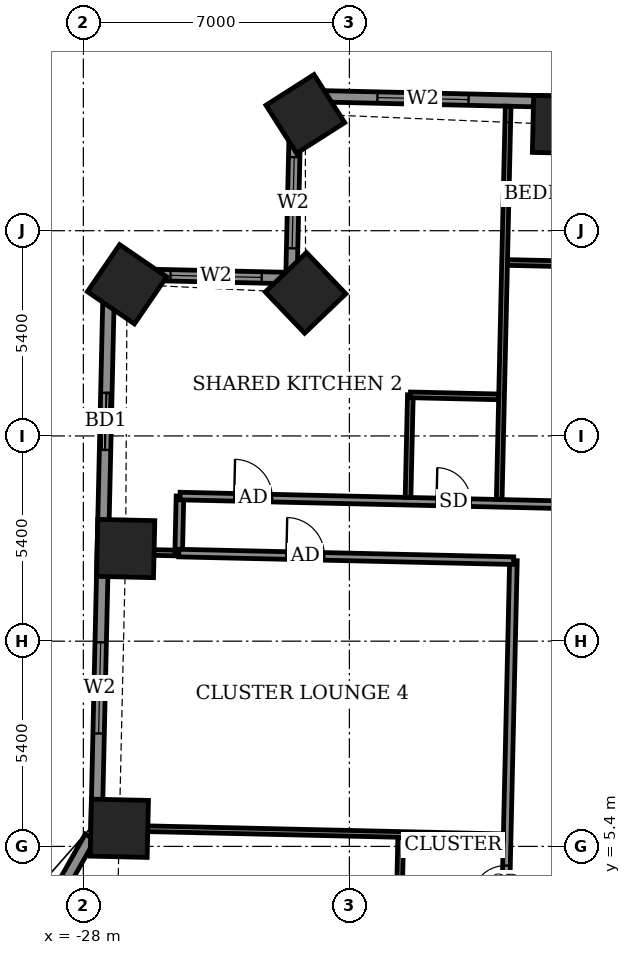
"""IFC4 building model, lengths in metres.
Left out: names, types, materials, properties, quantities, classifications, styles, units other than length and angle.
Written with IfcOpenShell. Run it as: python <this file> out.ifc"""

import sys

from ifc_helpers import new_model, si_unit, direction, frame, frame_2d, origin, origin_2d, place, context, subcontext, project, spatial, rectangle, extrude, element, fill, save


model = new_model("IFC4")
c1 = context("Model", 3, precision=1e-05, world=origin(), true_north=direction((0.0, 1.0)))
c2 = subcontext(c1, "Body", "Model", "MODEL_VIEW")
j1 = project(units=[si_unit("LENGTHUNIT", "METRE"), si_unit("PLANEANGLEUNIT", "RADIAN")], contexts=[c1])
p1 = place(None, origin())
s1 = spatial("IfcSite", under=j1, at=p1, CompositionType="ELEMENT")
p2 = place(p1, origin())
s2 = spatial("IfcBuilding", under=s1, at=p2, CompositionType="ELEMENT")
p3 = place(p2, frame((0.0, 0.0, 56.7)))
s3 = spatial("IfcBuildingStorey", under=s2, at=p3, CompositionType="ELEMENT", Elevation=56.7)
for number, where, z_axis, x_axis in (
    (1, (-15.419, 24.393, -0.55), (0.0, 0.0, 1.0), (-1.0, 0.023, 0.0)),
    (2, (-22.16, 24.673, -0.55), (0.0, 0.0, 1.0), (-0.843, -0.538, 0.0)),
    (3, (-22.154, 19.964, -0.55), (0.0, 0.0, 1.0), (-0.723, -0.691, 0.0)),
    (4, (-26.851, 20.191, -0.55), (0.0, 0.0, 1.0), (-0.565, -0.825, 0.0)),
    (5, (-26.887, 13.238, -0.55), (0.0, 0.0, 1.0), (-0.023, -1.0, 0.0)),
    (6, (-27.054, 5.877, -0.55), (0.0, 0.0, 1.0), (-0.023, -1.0, 0.0)),
):
    element("IfcColumn", number, at=place(p3, frame(where, z_axis=z_axis, x_axis=x_axis)), inside=s3, PredefinedType="COLUMN", context=c2, shape_type="SweptSolid", body=[
        extrude(rectangle(XDim=1.5, YDim=1.5, at=origin_2d()), origin(), (0.0, 0.0, 1.0), 3.6),
    ])
p4 = place(p3, frame((27.407, 24.021, 0.0), z_axis=(0.0, 0.0, 1.0), x_axis=(-0.99974239923, 0.022696589664, 0.0)))
e7 = element("IfcWall", 7, at=p4, inside=s3, PredefinedType="SOLIDWALL", context=c2, shape_type="SweptSolid", body=[
    extrude(rectangle(XDim=49.836, YDim=0.3, at=frame_2d((24.918, 0.0))), origin(), (0.0, 0.0, 1.0), 3.05),
])
p5 = place(p4, frame((2.871, 0.0, 0.0)))
e8 = element("IfcOpeningElement", 8, at=p5, cuts=e7, PredefinedType="OPENING", context=c2, shape_type="SweptSolid", body=[
    extrude(rectangle(XDim=1.5, YDim=2.4, at=frame_2d((0.75, 1.2))), frame((0.0, 0.16, 0.0), z_axis=(0.0, -1.0, 0.0), x_axis=(1.0, 0.0, 0.0)), (0.0, 0.0, 1.0), 0.32),
])
p6 = place(p4, frame((8.349, 0.0, 0.0)))
e9 = element("IfcOpeningElement", 9, at=p6, cuts=e7, PredefinedType="OPENING", context=c2, shape_type="SweptSolid", body=[
    extrude(rectangle(XDim=1.5, YDim=2.4, at=frame_2d((0.75, 1.2))), frame((0.0, 0.16, 0.0), z_axis=(0.0, -1.0, 0.0), x_axis=(1.0, 0.0, 0.0)), (0.0, 0.0, 1.0), 0.32),
])
p7 = place(p4, frame((11.43, 0.0, 0.0)))
e10 = element("IfcOpeningElement", 10, at=p7, cuts=e7, PredefinedType="OPENING", context=c2, shape_type="SweptSolid", body=[
    extrude(rectangle(XDim=1.5, YDim=2.4, at=frame_2d((0.75, 1.2))), frame((0.0, 0.16, 0.0), z_axis=(0.0, -1.0, 0.0), x_axis=(1.0, 0.0, 0.0)), (0.0, 0.0, 1.0), 0.32),
])
p8 = place(p4, frame((17.236, 0.0, 0.0)))
e11 = element("IfcOpeningElement", 11, at=p8, cuts=e7, PredefinedType="OPENING", context=c2, shape_type="SweptSolid", body=[
    extrude(rectangle(XDim=1.5, YDim=2.4, at=frame_2d((0.75, 1.2))), frame((0.0, 0.16, 0.0), z_axis=(0.0, -1.0, 0.0), x_axis=(1.0, 0.0, 0.0)), (0.0, 0.0, 1.0), 0.32),
])
p9 = place(p4, frame((22.686, 0.0, 0.0)))
e12 = element("IfcOpeningElement", 12, at=p9, cuts=e7, PredefinedType="OPENING", context=c2, shape_type="SweptSolid", body=[
    extrude(rectangle(XDim=1.5, YDim=2.4, at=frame_2d((0.75, 1.2))), frame((0.0, 0.16, 0.0), z_axis=(0.0, -1.0, 0.0), x_axis=(1.0, 0.0, 0.0)), (0.0, 0.0, 1.0), 0.32),
])
p10 = place(p4, frame((25.767, 0.0, 0.0)))
e13 = element("IfcOpeningElement", 13, at=p10, cuts=e7, PredefinedType="OPENING", context=c2, shape_type="SweptSolid", body=[
    extrude(rectangle(XDim=1.5, YDim=2.4, at=frame_2d((0.75, 1.2))), frame((0.0, 0.16, 0.0), z_axis=(0.0, -1.0, 0.0), x_axis=(1.0, 0.0, 0.0)), (0.0, 0.0, 1.0), 0.32),
])
p11 = place(p4, frame((31.211, 0.0, 0.0)))
e14 = element("IfcOpeningElement", 14, at=p11, cuts=e7, PredefinedType="OPENING", context=c2, shape_type="SweptSolid", body=[
    extrude(rectangle(XDim=1.5, YDim=2.4, at=frame_2d((0.75, 1.2))), frame((0.0, 0.16, 0.0), z_axis=(0.0, -1.0, 0.0), x_axis=(1.0, 0.0, 0.0)), (0.0, 0.0, 1.0), 0.32),
])
p12 = place(p4, frame((36.974, 0.0, 0.0)))
e15 = element("IfcOpeningElement", 15, at=p12, cuts=e7, PredefinedType="OPENING", context=c2, shape_type="SweptSolid", body=[
    extrude(rectangle(XDim=1.5, YDim=2.4, at=frame_2d((0.75, 1.2))), frame((0.0, 0.16, 0.0), z_axis=(0.0, -1.0, 0.0), x_axis=(1.0, 0.0, 0.0)), (0.0, 0.0, 1.0), 0.32),
])
p13 = place(p4, frame((40.055, 0.0, 0.0)))
e16 = element("IfcOpeningElement", 16, at=p13, cuts=e7, PredefinedType="OPENING", context=c2, shape_type="SweptSolid", body=[
    extrude(rectangle(XDim=1.5, YDim=2.4, at=frame_2d((0.75, 1.2))), frame((0.0, 0.16, 0.0), z_axis=(0.0, -1.0, 0.0), x_axis=(1.0, 0.0, 0.0)), (0.0, 0.0, 1.0), 0.32),
])
p14 = place(p4, frame((45.282, 0.0, 0.9)))
e17 = element("IfcOpeningElement", 17, at=p14, cuts=e7, PredefinedType="OPENING", context=c2, shape_type="SweptSolid", body=[
    extrude(rectangle(XDim=2.4, YDim=1.5, at=frame_2d((1.2, 0.75))), frame((0.0, 0.16, 0.0), z_axis=(0.0, -1.0, 0.0), x_axis=(1.0, 0.0, 0.0)), (0.0, 0.0, 1.0), 0.32),
])
p15 = place(p3, frame((-22.416, 25.152, 0.0), z_axis=(0.0, 0.0, 1.0), x_axis=(-0.022683280499, -0.999742701292, 0.0)))
e18 = element("IfcWall", 18, at=p15, inside=s3, PredefinedType="SOLIDWALL", context=c2, shape_type="SweptSolid", body=[
    extrude(rectangle(XDim=4.8, YDim=0.3, at=frame_2d((2.4, 0.0))), origin(), (0.0, 0.0, 1.0), 2.55),
])
p16 = place(p15, frame((1.617, 0.0, 0.9)))
e19 = element("IfcOpeningElement", 19, at=p16, cuts=e18, PredefinedType="OPENING", context=c2, shape_type="SweptSolid", body=[
    extrude(rectangle(XDim=2.4, YDim=1.5, at=frame_2d((1.2, 0.75))), frame((0.0, 0.16, 0.0), z_axis=(0.0, -1.0, 0.0), x_axis=(1.0, 0.0, 0.0)), (0.0, 0.0, 1.0), 0.32),
])
p17 = place(p3, frame((-22.525, 20.353, 0.0), z_axis=(0.0, 0.0, 1.0), x_axis=(-0.999742701292, 0.022683280499, 0.0)))
e20 = element("IfcWall", 20, at=p17, inside=s3, PredefinedType="SOLIDWALL", context=c2, shape_type="SweptSolid", body=[
    extrude(rectangle(XDim=4.8, YDim=0.3, at=frame_2d((2.4, 0.0))), origin(), (0.0, 0.0, 1.0), 2.55),
])
p18 = place(p17, frame((0.782, 0.0, 0.9)))
e21 = element("IfcOpeningElement", 21, at=p18, cuts=e20, PredefinedType="OPENING", context=c2, shape_type="SweptSolid", body=[
    extrude(rectangle(XDim=2.4, YDim=1.5, at=frame_2d((1.2, 0.75))), frame((0.0, 0.16, 0.0), z_axis=(0.0, -1.0, 0.0), x_axis=(1.0, 0.0, 0.0)), (0.0, 0.0, 1.0), 0.32),
])
p19 = place(p3, frame((-27.324, 20.462, 0.0), z_axis=(0.0, 0.0, 1.0), x_axis=(-0.022695628174, -0.999742421057, 0.0)))
e22 = element("IfcWall", 22, at=p19, inside=s3, PredefinedType="SOLIDWALL", context=c2, shape_type="SweptSolid", body=[
    extrude(rectangle(XDim=14.63, YDim=0.3, at=frame_2d((7.315, 0.0))), origin(), (0.0, 0.0, 1.0), 3.05),
])
p20 = place(p19, frame((3.13, 0.0, 0.0)))
e23 = element("IfcOpeningElement", 23, at=p20, cuts=e22, PredefinedType="OPENING", context=c2, shape_type="SweptSolid", body=[
    extrude(rectangle(XDim=1.5, YDim=2.4, at=frame_2d((0.75, 1.2))), frame((0.0, 0.16, 0.0), z_axis=(0.0, -1.0, 0.0), x_axis=(1.0, 0.0, 0.0)), (0.0, 0.0, 1.0), 0.32),
])
p21 = place(p19, frame((9.694, 0.0, 0.9)))
e24 = element("IfcOpeningElement", 24, at=p21, cuts=e22, PredefinedType="OPENING", context=c2, shape_type="SweptSolid", body=[
    extrude(rectangle(XDim=2.4, YDim=1.5, at=frame_2d((1.2, 0.75))), frame((0.0, 0.16, 0.0), z_axis=(0.0, -1.0, 0.0), x_axis=(1.0, 0.0, 0.0)), (0.0, 0.0, 1.0), 0.32),
])
p22 = place(p3, frame((-27.82, 5.65, 0.0), z_axis=(0.0, 0.0, 1.0), x_axis=(-0.492554919955, -0.870281363025, 0.0)))
e25 = element("IfcWall", 25, at=p22, inside=s3, PredefinedType="SOLIDWALL", context=c2, shape_type="SweptSolid", body=[
    extrude(rectangle(XDim=5.398, YDim=0.3, at=frame_2d((2.699, 0.0))), origin(), (0.0, 0.0, 1.0), 3.05),
])
p23 = place(p22, frame((2.008, 0.0, 0.9)))
e26 = element("IfcOpeningElement", 26, at=p23, cuts=e25, PredefinedType="OPENING", context=c2, shape_type="SweptSolid", body=[
    extrude(rectangle(XDim=1.2, YDim=1.5, at=frame_2d((0.6, 0.75))), frame((0.0, 0.16, 0.0), z_axis=(0.0, -1.0, 0.0), x_axis=(1.0, 0.0, 0.0)), (0.0, 0.0, 1.0), 0.32),
])
p24 = place(p3, frame((-17.287, -13.625, 0.0), z_axis=(0.0, 0.0, 1.0), x_axis=(0.022712214871, 0.999742044377, 0.0)))
e27 = element("IfcWall", 27, at=p24, inside=s3, PredefinedType="PARTITIONING", context=c2, shape_type="SweptSolid", body=[
    extrude(rectangle(XDim=26.551, YDim=0.2, at=frame_2d((13.275, 0.0))), origin(), (0.0, 0.0, 1.0), 3.05),
])
p25 = place(p24, frame((14.15, 0.0, 0.0)))
e28 = element("IfcOpeningElement", 28, at=p25, cuts=e27, PredefinedType="OPENING", context=c2, shape_type="SweptSolid", body=[
    extrude(rectangle(XDim=1.0, YDim=2.1, at=frame_2d((0.5, 1.05))), frame((0.0, 0.11, 0.0), z_axis=(0.0, -1.0, 0.0), x_axis=(1.0, 0.0, 0.0)), (0.0, 0.0, 1.0), 0.22),
])
p26 = place(p24, frame((17.625, 0.0, 0.0)))
e29 = element("IfcOpeningElement", 29, at=p26, cuts=e27, PredefinedType="OPENING", context=c2, shape_type="SweptSolid", body=[
    extrude(rectangle(XDim=0.9, YDim=2.1, at=frame_2d((0.45, 1.05))), frame((0.0, 0.11, 0.0), z_axis=(0.0, -1.0, 0.0), x_axis=(1.0, 0.0, 0.0)), (0.0, 0.0, 1.0), 0.22),
])
p27 = place(p24, frame((9.875, 0.0, 0.0)))
e30 = element("IfcOpeningElement", 30, at=p27, cuts=e27, PredefinedType="OPENING", context=c2, shape_type="SweptSolid", body=[
    extrude(rectangle(XDim=1.0, YDim=2.1, at=frame_2d((0.5, 1.05))), frame((0.0, 0.11, 0.0), z_axis=(0.0, -1.0, 0.0), x_axis=(1.0, 0.0, 0.0)), (0.0, 0.0, 1.0), 0.22),
])
p28 = place(p24, frame((6.475, 0.0, 0.0)))
e31 = element("IfcOpeningElement", 31, at=p28, cuts=e27, PredefinedType="OPENING", context=c2, shape_type="SweptSolid", body=[
    extrude(rectangle(XDim=0.9, YDim=2.1, at=frame_2d((0.45, 1.05))), frame((0.0, 0.11, 0.0), z_axis=(0.0, -1.0, 0.0), x_axis=(1.0, 0.0, 0.0)), (0.0, 0.0, 1.0), 0.22),
])
p29 = place(p24, frame((0.862, 0.0, 0.0)))
e32 = element("IfcOpeningElement", 32, at=p29, cuts=e27, PredefinedType="OPENING", context=c2, shape_type="SweptSolid", body=[
    extrude(rectangle(XDim=1.0, YDim=2.1, at=frame_2d((0.5, 1.05))), frame((0.0, 0.11, 0.0), z_axis=(0.0, -1.0, 0.0), x_axis=(1.0, 0.0, 0.0)), (0.0, 0.0, 1.0), 0.22),
])
p30 = place(p24, frame((3.675, 0.0, 0.0)))
e33 = element("IfcOpeningElement", 33, at=p30, cuts=e27, PredefinedType="OPENING", context=c2, shape_type="SweptSolid", body=[
    extrude(rectangle(XDim=0.9, YDim=2.1, at=frame_2d((0.45, 1.05))), frame((0.0, 0.11, 0.0), z_axis=(0.0, -1.0, 0.0), x_axis=(1.0, 0.0, 0.0)), (0.0, 0.0, 1.0), 0.22),
])
p31 = place(p3, frame((-19.703, 3.31, 0.0), z_axis=(0.0, 0.0, 1.0), x_axis=(0.02279059109, 0.999740260747, 0.0)))
e34 = element("IfcWall", 34, at=p31, inside=s3, PredefinedType="PARTITIONING", context=c2, shape_type="SweptSolid", body=[
    extrude(rectangle(XDim=2.324, YDim=0.15, at=frame_2d((1.162, 0.0))), origin(), (0.0, 0.0, 1.0), 3.05),
])
p32 = place(p3, frame((-27.505, 5.892, 0.0), z_axis=(0.0, 0.0, 1.0), x_axis=(0.999743990669, -0.022626381091, 0.0)))
e35 = element("IfcWall", 35, at=p32, inside=s3, PredefinedType="PARTITIONING", context=c2, shape_type="SweptSolid", body=[
    extrude(rectangle(XDim=10.563, YDim=0.15, at=frame_2d((5.282, 0.0))), origin(), (0.0, 0.0, 1.0), 3.05),
])
p33 = place(p3, frame((-27.34, 13.16, 0.0), z_axis=(0.0, 0.0, 1.0), x_axis=(0.999743599624, -0.02264365277, 0.0)))
e36 = element("IfcWall", 36, at=p33, inside=s3, PredefinedType="PARTITIONING", context=c2, shape_type="SweptSolid", body=[
    extrude(rectangle(XDim=1.854, YDim=0.15, at=frame_2d((0.927, 0.0))), origin(), (0.0, 0.0, 1.0), 3.05),
])
p34 = place(p3, frame((-25.492, 13.118, 0.0), z_axis=(0.0, 0.0, 1.0), x_axis=(0.022617910375, 0.999744182344, 0.0)))
e37 = element("IfcWall", 37, at=p34, inside=s3, PredefinedType="PARTITIONING", context=c2, shape_type="SweptSolid", body=[
    extrude(rectangle(XDim=1.5, YDim=0.2, at=frame_2d((0.75, 0.0))), origin(), (0.0, 0.0, 1.0), 3.05),
])
p35 = place(p3, frame((-25.49, 13.118, 0.0), z_axis=(0.0, 0.0, 1.0), x_axis=(0.999742607231, -0.02268742575, 0.0)))
e38 = element("IfcWall", 38, at=p35, inside=s3, PredefinedType="PARTITIONING", context=c2, shape_type="SweptSolid", body=[
    extrude(rectangle(XDim=8.813, YDim=0.2, at=frame_2d((4.407, 0.0))), origin(), (0.0, 0.0, 1.0), 3.05),
])
p36 = place(p35, frame((2.832, 0.0, 0.0)))
e39 = element("IfcOpeningElement", 39, at=p36, cuts=e38, PredefinedType="OPENING", context=c2, shape_type="SweptSolid", body=[
    extrude(rectangle(XDim=1.0, YDim=2.1, at=frame_2d((0.5, 1.05))), frame((0.0, 0.11, 0.0), z_axis=(0.0, -1.0, 0.0), x_axis=(1.0, 0.0, 0.0)), (0.0, 0.0, 1.0), 0.22),
])
p37 = place(p3, frame((-25.456, 14.618, 0.0), z_axis=(0.0, 0.0, 1.0), x_axis=(0.999742687583, -0.0226838847, 0.0)))
e40 = element("IfcWall", 40, at=p37, inside=s3, PredefinedType="PARTITIONING", context=c2, shape_type="SweptSolid", body=[
    extrude(rectangle(XDim=54.836, YDim=0.2, at=frame_2d((27.418, 0.0))), origin(), (0.0, 0.0, 1.0), 3.05),
])
p38 = place(p37, frame((52.493, 0.0, 0.0)))
e41 = element("IfcOpeningElement", 41, at=p38, cuts=e40, PredefinedType="OPENING", context=c2, shape_type="SweptSolid", body=[
    extrude(rectangle(XDim=1.0, YDim=2.1, at=frame_2d((0.5, 1.05))), frame((0.0, 0.11, 0.0), z_axis=(0.0, -1.0, 0.0), x_axis=(1.0, 0.0, 0.0)), (0.0, 0.0, 1.0), 0.22),
])
p39 = place(p37, frame((47.25, 0.0, 0.0)))
e42 = element("IfcOpeningElement", 42, at=p39, cuts=e40, PredefinedType="OPENING", context=c2, shape_type="SweptSolid", body=[
    extrude(rectangle(XDim=0.9, YDim=2.1, at=frame_2d((0.45, 1.05))), frame((0.0, 0.11, 0.0), z_axis=(0.0, -1.0, 0.0), x_axis=(1.0, 0.0, 0.0)), (0.0, 0.0, 1.0), 0.22),
])
p40 = place(p37, frame((42.525, 0.0, 0.0)))
e43 = element("IfcOpeningElement", 43, at=p40, cuts=e40, PredefinedType="OPENING", context=c2, shape_type="SweptSolid", body=[
    extrude(rectangle(XDim=0.9, YDim=2.1, at=frame_2d((0.45, 1.05))), frame((0.0, 0.11, 0.0), z_axis=(0.0, -1.0, 0.0), x_axis=(1.0, 0.0, 0.0)), (0.0, 0.0, 1.0), 0.22),
])
p41 = place(p37, frame((40.275, 0.0, 0.0)))
e44 = element("IfcOpeningElement", 44, at=p41, cuts=e40, PredefinedType="OPENING", context=c2, shape_type="SweptSolid", body=[
    extrude(rectangle(XDim=0.9, YDim=2.1, at=frame_2d((0.45, 1.05))), frame((0.0, 0.11, 0.0), z_axis=(0.0, -1.0, 0.0), x_axis=(1.0, 0.0, 0.0)), (0.0, 0.0, 1.0), 0.22),
])
p42 = place(p37, frame((33.0, 0.0, 0.0)))
e45 = element("IfcOpeningElement", 45, at=p42, cuts=e40, PredefinedType="OPENING", context=c2, shape_type="SweptSolid", body=[
    extrude(rectangle(XDim=0.9, YDim=2.1, at=frame_2d((0.45, 1.05))), frame((0.0, 0.11, 0.0), z_axis=(0.0, -1.0, 0.0), x_axis=(1.0, 0.0, 0.0)), (0.0, 0.0, 1.0), 0.22),
])
p43 = place(p37, frame((30.65, 0.0, 0.0)))
e46 = element("IfcOpeningElement", 46, at=p43, cuts=e40, PredefinedType="OPENING", context=c2, shape_type="SweptSolid", body=[
    extrude(rectangle(XDim=0.9, YDim=2.1, at=frame_2d((0.45, 1.05))), frame((0.0, 0.11, 0.0), z_axis=(0.0, -1.0, 0.0), x_axis=(1.0, 0.0, 0.0)), (0.0, 0.0, 1.0), 0.22),
])
p44 = place(p37, frame((23.7, 0.0, 0.0)))
e47 = element("IfcOpeningElement", 47, at=p44, cuts=e40, PredefinedType="OPENING", context=c2, shape_type="SweptSolid", body=[
    extrude(rectangle(XDim=0.9, YDim=2.1, at=frame_2d((0.45, 1.05))), frame((0.0, 0.11, 0.0), z_axis=(0.0, -1.0, 0.0), x_axis=(1.0, 0.0, 0.0)), (0.0, 0.0, 1.0), 0.22),
])
p45 = place(p37, frame((21.425, 0.0, 0.0)))
e48 = element("IfcOpeningElement", 48, at=p45, cuts=e40, PredefinedType="OPENING", context=c2, shape_type="SweptSolid", body=[
    extrude(rectangle(XDim=0.9, YDim=2.1, at=frame_2d((0.45, 1.05))), frame((0.0, 0.11, 0.0), z_axis=(0.0, -1.0, 0.0), x_axis=(1.0, 0.0, 0.0)), (0.0, 0.0, 1.0), 0.22),
])
p46 = place(p37, frame((14.15, 0.0, 0.0)))
e49 = element("IfcOpeningElement", 49, at=p46, cuts=e40, PredefinedType="OPENING", context=c2, shape_type="SweptSolid", body=[
    extrude(rectangle(XDim=0.9, YDim=2.1, at=frame_2d((0.45, 1.05))), frame((0.0, 0.11, 0.0), z_axis=(0.0, -1.0, 0.0), x_axis=(1.0, 0.0, 0.0)), (0.0, 0.0, 1.0), 0.22),
])
p47 = place(p37, frame((11.625, 0.0, 0.0)))
e50 = element("IfcOpeningElement", 50, at=p47, cuts=e40, PredefinedType="OPENING", context=c2, shape_type="SweptSolid", body=[
    extrude(rectangle(XDim=0.9, YDim=2.1, at=frame_2d((0.45, 1.05))), frame((0.0, 0.11, 0.0), z_axis=(0.0, -1.0, 0.0), x_axis=(1.0, 0.0, 0.0)), (0.0, 0.0, 1.0), 0.22),
])
p48 = place(p37, frame((1.425, 0.0, 0.0)))
e51 = element("IfcOpeningElement", 51, at=p48, cuts=e40, PredefinedType="OPENING", context=c2, shape_type="SweptSolid", body=[
    extrude(rectangle(XDim=1.0, YDim=2.1, at=frame_2d((0.5, 1.05))), frame((0.0, 0.11, 0.0), z_axis=(0.0, -1.0, 0.0), x_axis=(1.0, 0.0, 0.0)), (0.0, 0.0, 1.0), 0.22),
])
p49 = place(p37, frame((6.75, 0.0, 0.0)))
e52 = element("IfcOpeningElement", 52, at=p49, cuts=e40, PredefinedType="OPENING", context=c2, shape_type="SweptSolid", body=[
    extrude(rectangle(XDim=0.9, YDim=2.1, at=frame_2d((0.45, 1.05))), frame((0.0, 0.11, 0.0), z_axis=(0.0, -1.0, 0.0), x_axis=(1.0, 0.0, 0.0)), (0.0, 0.0, 1.0), 0.22),
])
p50 = place(p3, frame((-19.457, 14.582, 0.0), z_axis=(0.0, 0.0, 1.0), x_axis=(0.02260842146, 0.999744396973, 0.0)))
e53 = element("IfcWall", 53, at=p50, inside=s3, PredefinedType="PARTITIONING", context=c2, shape_type="SweptSolid", body=[
    extrude(rectangle(XDim=2.7, YDim=0.15, at=frame_2d((1.35, 0.0))), origin(), (0.0, 0.0, 1.0), 3.05),
])
p51 = place(p3, frame((-17.058, 14.527, 0.0), z_axis=(0.0, 0.0, 1.0), x_axis=(0.022714440015, 0.999741993824, 0.0)))
e54 = element("IfcWall", 54, at=p51, inside=s3, PredefinedType="PARTITIONING", context=c2, shape_type="SweptSolid", body=[
    extrude(rectangle(XDim=10.351, YDim=0.15, at=frame_2d((5.175, 0.0))), origin(), (0.0, 0.0, 1.0), 2.55),
])
p52 = place(p3, frame((-19.394, 17.281, 0.0), z_axis=(0.0, 0.0, 1.0), x_axis=(0.999740260747, -0.02279059109, 0.0)))
e55 = element("IfcWall", 55, at=p52, inside=s3, PredefinedType="PARTITIONING", context=c2, shape_type="SweptSolid", body=[
    extrude(rectangle(XDim=2.324, YDim=0.15, at=frame_2d((1.162, 0.0))), origin(), (0.0, 0.0, 1.0), 3.05),
])
p53 = place(p3, frame((-16.839, 20.764, 0.0), z_axis=(0.0, 0.0, 1.0), x_axis=(0.99974031529, -0.022788198363, 0.0)))
e56 = element("IfcWall", 56, at=p53, inside=s3, PredefinedType="PARTITIONING", context=c2, shape_type="SweptSolid", body=[
    extrude(rectangle(XDim=2.325, YDim=0.15, at=frame_2d((1.162, 0.0))), origin(), (0.0, 0.0, 1.0), 3.05),
])
p54 = place(p14, origin())
e57 = element("IfcWindow", 57, at=p54, inside=s3, PartitioningType="DOUBLE_PANEL_VERTICAL", PredefinedType="WINDOW", context=c2, shape_type="SweptSolid", body=[
    extrude(rectangle(XDim=2.4, YDim=1.5, at=frame_2d((1.2, 0.75))), frame((0.0, 0.03, 0.0), z_axis=(0.0, -1.0, 0.0), x_axis=(1.0, 0.0, 0.0)), (0.0, 0.0, 1.0), 0.06),
])
fill(e17, e57)
p55 = place(p16, origin())
e58 = element("IfcWindow", 58, at=p55, inside=s3, PartitioningType="DOUBLE_PANEL_VERTICAL", PredefinedType="WINDOW", context=c2, shape_type="SweptSolid", body=[
    extrude(rectangle(XDim=2.4, YDim=1.5, at=frame_2d((1.2, 0.75))), frame((0.0, 0.03, 0.0), z_axis=(0.0, -1.0, 0.0), x_axis=(1.0, 0.0, 0.0)), (0.0, 0.0, 1.0), 0.06),
])
fill(e19, e58)
p56 = place(p18, origin())
e59 = element("IfcWindow", 59, at=p56, inside=s3, PartitioningType="DOUBLE_PANEL_VERTICAL", PredefinedType="WINDOW", context=c2, shape_type="SweptSolid", body=[
    extrude(rectangle(XDim=2.4, YDim=1.5, at=frame_2d((1.2, 0.75))), frame((0.0, 0.03, 0.0), z_axis=(0.0, -1.0, 0.0), x_axis=(1.0, 0.0, 0.0)), (0.0, 0.0, 1.0), 0.06),
])
fill(e21, e59)
p57 = place(p20, origin())
e60 = element("IfcDoor", 60, at=p57, inside=s3, OperationType="SLIDING_TO_LEFT", PredefinedType="DOOR", context=c2, shape_type="SweptSolid", body=[
    extrude(rectangle(XDim=1.5, YDim=2.4, at=frame_2d((0.75, 1.2))), frame((0.0, 0.025, 0.0), z_axis=(0.0, -1.0, 0.0), x_axis=(1.0, 0.0, 0.0)), (0.0, 0.0, 1.0), 0.05),
])
fill(e23, e60)
p58 = place(p21, origin())
e61 = element("IfcWindow", 61, at=p58, inside=s3, PartitioningType="DOUBLE_PANEL_VERTICAL", PredefinedType="WINDOW", context=c2, shape_type="SweptSolid", body=[
    extrude(rectangle(XDim=2.4, YDim=1.5, at=frame_2d((1.2, 0.75))), frame((0.0, 0.03, 0.0), z_axis=(0.0, -1.0, 0.0), x_axis=(1.0, 0.0, 0.0)), (0.0, 0.0, 1.0), 0.06),
])
fill(e24, e61)
p59 = place(p48, origin())
e62 = element("IfcDoor", 62, at=p59, inside=s3, OperationType="SINGLE_SWING_RIGHT", PredefinedType="DOOR", context=c2, shape_type="SweptSolid", body=[
    extrude(rectangle(XDim=1.0, YDim=2.1, at=frame_2d((0.5, 1.05))), frame((0.0, 0.025, 0.0), z_axis=(0.0, -1.0, 0.0), x_axis=(1.0, 0.0, 0.0)), (0.0, 0.0, 1.0), 0.05),
])
fill(e51, e62)
p60 = place(p49, origin())
e63 = element("IfcDoor", 63, at=p60, inside=s3, OperationType="SINGLE_SWING_RIGHT", PredefinedType="DOOR", context=c2, shape_type="SweptSolid", body=[
    extrude(rectangle(XDim=0.9, YDim=2.1, at=frame_2d((0.45, 1.05))), frame((0.0, 0.025, 0.0), z_axis=(0.0, -1.0, 0.0), x_axis=(1.0, 0.0, 0.0)), (0.0, 0.0, 1.0), 0.05),
])
fill(e52, e63)
p61 = place(p36, origin())
e64 = element("IfcDoor", 64, at=p61, inside=s3, OperationType="SINGLE_SWING_LEFT", PredefinedType="DOOR", context=c2, shape_type="SweptSolid", body=[
    extrude(rectangle(XDim=1.0, YDim=2.1, at=frame_2d((0.5, 1.05))), frame((0.0, 0.025, 0.0), z_axis=(0.0, -1.0, 0.0), x_axis=(1.0, 0.0, 0.0)), (0.0, 0.0, 1.0), 0.05),
])
fill(e39, e64)
p62 = place(p26, origin())
e65 = element("IfcDoor", 65, at=p62, inside=s3, OperationType="SINGLE_SWING_LEFT", PredefinedType="DOOR", context=c2, shape_type="SweptSolid", body=[
    extrude(rectangle(XDim=0.9, YDim=2.1, at=frame_2d((0.45, 1.05))), frame((0.0, 0.025, 0.0), z_axis=(0.0, -1.0, 0.0), x_axis=(1.0, 0.0, 0.0)), (0.0, 0.0, 1.0), 0.05),
])
fill(e29, e65)
save(model, sys.argv[1])
